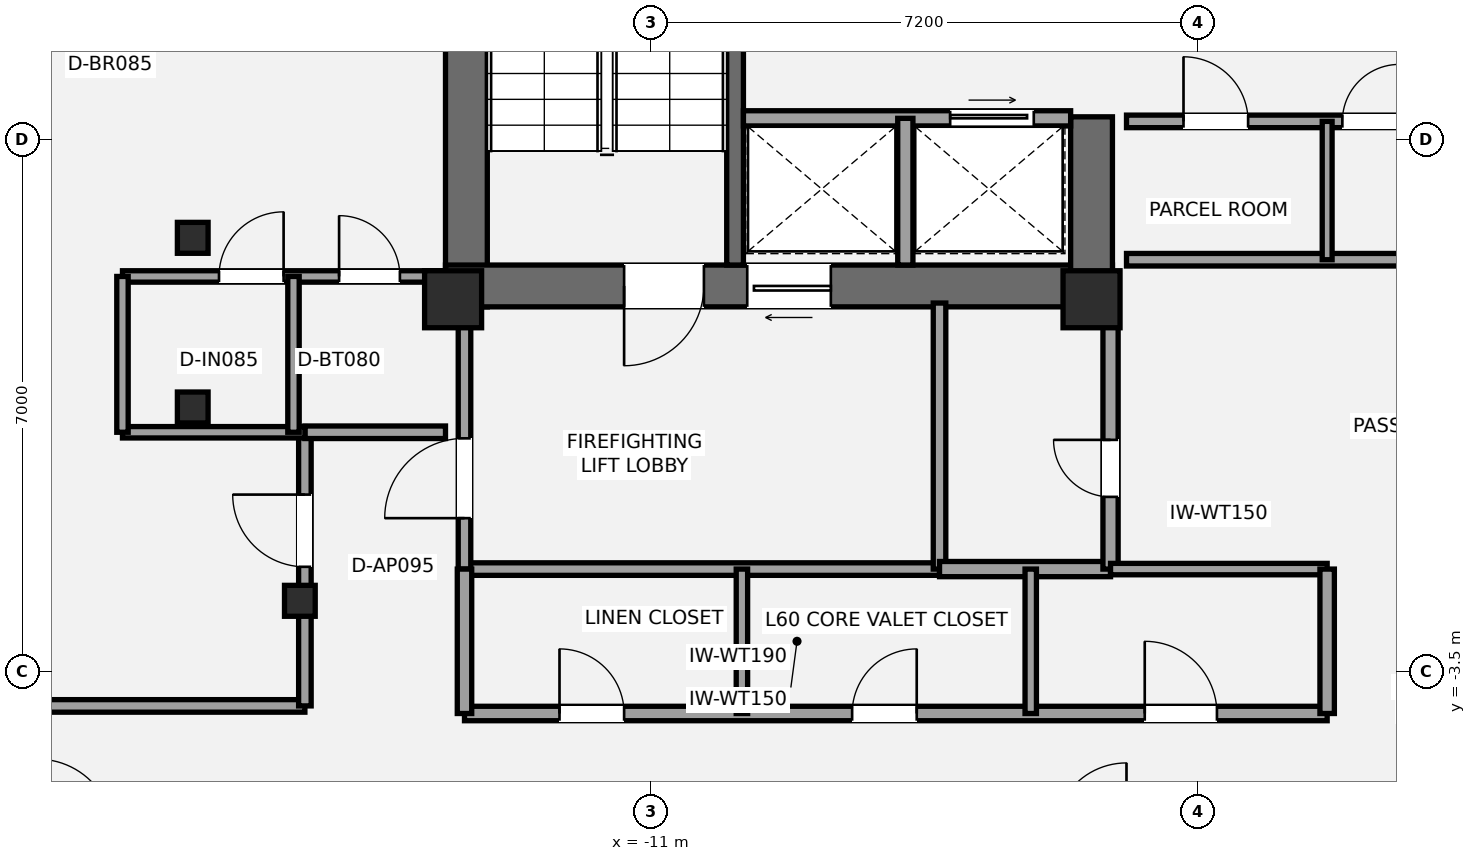
"""IFC4 building model, lengths in metres.
Left out: names, types, materials, properties, quantities, classifications, styles, units other than length and angle.
Written with IfcOpenShell. Run it as: python <this file> out.ifc"""

import sys

from ifc_helpers import new_model, si_unit, direction, frame, frame_2d, origin, origin_2d, place, context, subcontext, project, spatial, rectangle, i_section, extrude, element, fill, save


model = new_model("IFC4")
c1 = context("Model", 3, precision=1e-05, world=origin(), true_north=direction((0.0, 1.0)))
c2 = subcontext(c1, "Body", "Model", "MODEL_VIEW")
j1 = project(units=[si_unit("LENGTHUNIT", "METRE"), si_unit("PLANEANGLEUNIT", "RADIAN")], contexts=[c1])
p1 = place(None, origin())
s1 = spatial("IfcSite", under=j1, at=p1, CompositionType="ELEMENT")
p2 = place(p1, origin())
s2 = spatial("IfcBuilding", under=s1, at=p2, CompositionType="ELEMENT")
p3 = place(p2, frame((0.0, 0.0, 216.3)))
s3 = spatial("IfcBuildingStorey", under=s2, at=p3, CompositionType="ELEMENT", Elevation=216.3)
p4 = place(p3, frame((-13.425, 1.3, 0.0), z_axis=(0.0, 0.0, 1.0), x_axis=(0.0, 1.0, 0.0)))
e1 = element("IfcWall", 1, at=p4, inside=s3, PredefinedType="SHEAR", context=c2, shape_type="SweptSolid", body=[
    extrude(rectangle(XDim=8.25, YDim=0.55, at=frame_2d((4.125, 0.0))), origin(), (0.0, 0.0, 1.0), 3.15),
])
p5 = place(p3, frame((-4.925, 1.575, 0.0), z_axis=(0.0, 0.0, 1.0), x_axis=(-1.0, 0.0, 0.0)))
e2 = element("IfcWall", 2, at=p5, inside=s3, PredefinedType="SHEAR", context=c2, shape_type="SweptSolid", body=[
    extrude(rectangle(XDim=8.775, YDim=0.55, at=frame_2d((4.387, 0.0))), origin(), (0.0, 0.0, 1.0), 3.15),
])
p6 = place(p5, frame((5.375, 0.0, 0.0)))
e3 = element("IfcOpeningElement", 3, at=p6, cuts=e2, PredefinedType="OPENING", context=c2, shape_type="SweptSolid", body=[
    extrude(rectangle(XDim=1.05, YDim=2.15, at=frame_2d((0.525, 1.075))), frame((0.0, 0.285, 0.0), z_axis=(0.0, -1.0, 0.0), x_axis=(1.0, 0.0, 0.0)), (0.0, 0.0, 1.0), 0.57),
])
p7 = place(p5, frame((3.705, 0.0, 0.0)))
e4 = element("IfcOpeningElement", 4, at=p7, cuts=e2, PredefinedType="OPENING", context=c2, shape_type="SweptSolid", body=[
    extrude(rectangle(XDim=1.1, YDim=2.2, at=frame_2d((0.55, 1.1))), frame((0.0, 0.285, 0.0), z_axis=(0.0, -1.0, 0.0), x_axis=(1.0, 0.0, 0.0)), (0.0, 0.0, 1.0), 0.57),
])
p8 = place(p3, frame((-5.2, 1.3, 0.0), z_axis=(0.0, 0.0, 1.0), x_axis=(0.0, 1.0, 0.0)))
e5 = element("IfcWall", 5, at=p8, inside=s3, PredefinedType="SHEAR", context=c2, shape_type="SweptSolid", body=[
    extrude(rectangle(XDim=2.5, YDim=0.55, at=frame_2d((1.25, 0.0))), origin(), (0.0, 0.0, 1.0), 3.15),
])
p9 = place(p3, frame((-9.89, 1.85, 0.0), z_axis=(0.0, 0.0, 1.0), x_axis=(0.0, 1.0, 0.0)))
e6 = element("IfcWall", 6, at=p9, inside=s3, PredefinedType="SHEAR", context=c2, shape_type="SweptSolid", body=[
    extrude(rectangle(XDim=7.15, YDim=0.22, at=frame_2d((3.575, 0.0))), origin(), (0.0, 0.0, 1.0), 3.15),
])
for number, where, z_axis, x_axis in (
    (7, (-13.6, 1.4, 0.0), (0.0, 0.0, 1.0), (1.0, 0.0, 0.0)),
    (8, (-5.2, 1.4, 0.0), (0.0, 0.0, 1.0), (1.0, 0.0, 0.0)),
):
    element("IfcColumn", number, at=place(p3, frame(where, z_axis=z_axis, x_axis=x_axis)), inside=s3, PredefinedType="PILASTER", context=c2, shape_type="SweptSolid", body=[
        extrude(rectangle(XDim=0.75, YDim=0.75, at=origin_2d()), origin(), (0.0, 0.0, 1.0), 3.15),
    ])
for number, where, z_axis, x_axis in (
    (9, (-17.026, 2.208, 0.0), (0.0, 0.0, 1.0), (1.0, 0.0, 0.0)),
    (10, (-17.026, -0.024, 0.0), (0.0, 0.0, 1.0), (1.0, 0.0, 0.0)),
    (11, (-15.616, -2.567, 0.0), (0.0, 0.0, 1.0), (1.0, 0.0, 0.0)),
):
    element("IfcColumn", number, at=place(p3, frame(where, z_axis=z_axis, x_axis=x_axis)), inside=s3, PredefinedType="COLUMN", context=c2, shape_type="SweptSolid", body=[
        extrude(i_section(OverallWidth=0.404, OverallDepth=0.407, WebThickness=0.027, FlangeThickness=0.044, at=origin_2d()), origin(), (0.0, 0.0, 1.0), 3.15),
    ])
p10 = place(p3, frame((-13.45, -2.15, 0.0), z_axis=(0.0, 0.0, 1.0), x_axis=(1.0, 0.0, 0.0)))
e12 = element("IfcWall", 12, at=p10, inside=s3, PredefinedType="PARTITIONING", context=c2, shape_type="SweptSolid", body=[
    extrude(rectangle(XDim=6.25, YDim=0.165, at=frame_2d((3.125, 0.0))), origin(), (0.0, 0.0, 1.0), 2.423),
])
p11 = place(p3, frame((-13.45, -2.15, 0.0), z_axis=(0.0, 0.0, 1.0), x_axis=(0.0, 1.0, 0.0)))
e13 = element("IfcWall", 13, at=p11, inside=s3, PredefinedType="PARTITIONING", context=c2, shape_type="SweptSolid", body=[
    extrude(rectangle(XDim=3.5, YDim=0.165, at=frame_2d((1.75, 0.0))), origin(), (0.0, 0.0, 1.0), 2.423),
])
p12 = place(p11, frame((0.67, 0.0, 0.0)))
e14 = element("IfcOpeningElement", 14, at=p12, cuts=e13, PredefinedType="OPENING", context=c2, shape_type="SweptSolid", body=[
    extrude(rectangle(XDim=1.05, YDim=2.15, at=frame_2d((0.525, 1.075))), frame((0.0, 0.093, 0.0), z_axis=(0.0, -1.0, 0.0), x_axis=(1.0, 0.0, 0.0)), (0.0, 0.0, 1.0), 0.185),
])
p13 = place(p3, frame((-7.2, -2.15, 0.0), z_axis=(0.0, 0.0, 1.0), x_axis=(0.0, 1.0, 0.0)))
e15 = element("IfcWall", 15, at=p13, inside=s3, PredefinedType="PARTITIONING", context=c2, shape_type="SweptSolid", body=[
    extrude(rectangle(XDim=3.5, YDim=0.165, at=frame_2d((1.75, 0.0))), origin(), (0.0, 0.0, 1.0), 2.423),
])
p14 = place(p3, frame((-7.2, -2.15, 0.0), z_axis=(0.0, 0.0, 1.0), x_axis=(1.0, 0.0, 0.0)))
e16 = element("IfcWall", 16, at=p14, inside=s3, PredefinedType="SOLIDWALL", context=c2, shape_type="SweptSolid", body=[
    extrude(rectangle(XDim=2.25, YDim=0.2, at=frame_2d((1.125, 0.0))), origin(), (0.0, 0.0, 1.0), 2.423),
])
p15 = place(p3, frame((-4.95, -2.15, 0.0), z_axis=(0.0, 0.0, 1.0), x_axis=(0.0, 1.0, 0.0)))
e17 = element("IfcWall", 17, at=p15, inside=s3, PredefinedType="SOLIDWALL", context=c2, shape_type="SweptSolid", body=[
    extrude(rectangle(XDim=3.5, YDim=0.2, at=frame_2d((1.75, 0.0))), origin(), (0.0, 0.0, 1.0), 2.423),
])
p16 = place(p15, frame((0.95, 0.0, 0.0)))
e18 = element("IfcOpeningElement", 18, at=p16, cuts=e17, PredefinedType="OPENING", context=c2, shape_type="SweptSolid", body=[
    extrude(rectangle(XDim=0.75, YDim=2.1, at=frame_2d((0.375, 1.05))), frame((0.0, 0.11, 0.0), z_axis=(0.0, -1.0, 0.0), x_axis=(1.0, 0.0, 0.0)), (0.0, 0.0, 1.0), 0.22),
])
p17 = place(p3, frame((-9.78, 3.78, 0.0), z_axis=(0.0, 0.0, 1.0), x_axis=(1.0, 0.0, 0.0)))
e19 = element("IfcWall", 19, at=p17, inside=s3, PredefinedType="SOLIDWALL", context=c2, shape_type="SweptSolid", body=[
    extrude(rectangle(XDim=4.305, YDim=0.2, at=frame_2d((2.152, 0.0))), origin(), (0.0, 0.0, 1.0), 2.97),
])
p18 = place(p17, frame((2.72, 0.0, 0.0)))
e20 = element("IfcOpeningElement", 20, at=p18, cuts=e19, PredefinedType="OPENING", context=c2, shape_type="SweptSolid", body=[
    extrude(rectangle(XDim=1.1, YDim=2.2, at=frame_2d((0.55, 1.1))), frame((0.0, 0.11, 0.0), z_axis=(0.0, -1.0, 0.0), x_axis=(1.0, 0.0, 0.0)), (0.0, 0.0, 1.0), 0.22),
])
p19 = place(p3, frame((-7.65, 1.85, 0.0), z_axis=(0.0, 0.0, 1.0), x_axis=(0.0, 1.0, 0.0)))
e21 = element("IfcWall", 21, at=p19, inside=s3, PredefinedType="SOLIDWALL", context=c2, shape_type="SweptSolid", body=[
    extrude(rectangle(XDim=1.93, YDim=0.2, at=frame_2d((0.965, 0.0))), origin(), (0.0, 0.0, 1.0), 2.97),
])
p20 = place(p3, frame((-4.74, 1.92, 0.0), z_axis=(0.0, 0.0, 1.0), x_axis=(1.0, 0.0, 0.0)))
e22 = element("IfcWall", 22, at=p20, inside=s3, PredefinedType="PARTITIONING", context=c2, shape_type="SweptSolid", body=[
    extrude(rectangle(XDim=3.89, YDim=0.165, at=frame_2d((1.945, 0.0))), origin(), (0.0, 0.0, 1.0), 2.11),
])
p21 = place(p3, frame((-4.74, 3.74, 0.0), z_axis=(0.0, 0.0, 1.0), x_axis=(1.0, 0.0, 0.0)))
e23 = element("IfcWall", 23, at=p21, inside=s3, PredefinedType="PARTITIONING", context=c2, shape_type="SweptSolid", body=[
    extrude(rectangle(XDim=3.89, YDim=0.165, at=frame_2d((1.945, 0.0))), origin(), (0.0, 0.0, 1.0), 2.97),
])
p22 = place(p21, frame((0.75, 0.0, 0.0)))
e24 = element("IfcOpeningElement", 24, at=p22, cuts=e23, PredefinedType="OPENING", context=c2, shape_type="SweptSolid", body=[
    extrude(rectangle(XDim=0.85, YDim=2.1, at=frame_2d((0.425, 1.05))), frame((0.0, 0.093, 0.0), z_axis=(0.0, -1.0, 0.0), x_axis=(1.0, 0.0, 0.0)), (0.0, 0.0, 1.0), 0.185),
])
p23 = place(p21, frame((2.84, 0.0, 0.0)))
e25 = element("IfcOpeningElement", 25, at=p23, cuts=e23, PredefinedType="OPENING", context=c2, shape_type="SweptSolid", body=[
    extrude(rectangle(XDim=0.75, YDim=2.1, at=frame_2d((0.375, 1.05))), frame((0.0, 0.093, 0.0), z_axis=(0.0, -1.0, 0.0), x_axis=(1.0, 0.0, 0.0)), (0.0, 0.0, 1.0), 0.185),
])
p24 = place(p3, frame((-2.1, 1.92, 0.0), z_axis=(0.0, 0.0, 1.0), x_axis=(0.0, 1.0, 0.0)))
e26 = element("IfcWall", 26, at=p24, inside=s3, PredefinedType="PARTITIONING", context=c2, shape_type="SweptSolid", body=[
    extrude(rectangle(XDim=1.82, YDim=0.13, at=frame_2d((0.91, 0.0))), origin(), (0.0, 0.0, 1.0), 2.97),
])
p25 = place(p3, frame((-13.45, -4.05, 0.0), z_axis=(0.0, 0.0, 1.0), x_axis=(1.0, 0.0, 0.0)))
e27 = element("IfcWall", 27, at=p25, inside=s3, PredefinedType="PLUMBINGWALL", context=c2, shape_type="SweptSolid", body=[
    extrude(rectangle(XDim=11.35, YDim=0.19, at=frame_2d((5.675, 0.0))), origin(), (0.0, 0.0, 1.0), 2.357),
])
p26 = place(p25, frame((1.25, 0.0, 0.0)))
e28 = element("IfcOpeningElement", 28, at=p26, cuts=e27, PredefinedType="OPENING", context=c2, shape_type="SweptSolid", body=[
    extrude(rectangle(XDim=0.85, YDim=2.1, at=frame_2d((0.425, 1.05))), frame((0.0, 0.105, 0.0), z_axis=(0.0, -1.0, 0.0), x_axis=(1.0, 0.0, 0.0)), (0.0, 0.0, 1.0), 0.21),
])
p27 = place(p25, frame((5.1, 0.0, 0.0)))
e29 = element("IfcOpeningElement", 29, at=p27, cuts=e27, PredefinedType="OPENING", context=c2, shape_type="SweptSolid", body=[
    extrude(rectangle(XDim=0.85, YDim=2.1, at=frame_2d((0.425, 1.05))), frame((0.0, 0.105, 0.0), z_axis=(0.0, -1.0, 0.0), x_axis=(1.0, 0.0, 0.0)), (0.0, 0.0, 1.0), 0.21),
])
p28 = place(p25, frame((8.95, 0.0, 0.0)))
e30 = element("IfcOpeningElement", 30, at=p28, cuts=e27, PredefinedType="OPENING", context=c2, shape_type="SweptSolid", body=[
    extrude(rectangle(XDim=0.95, YDim=2.15, at=frame_2d((0.475, 1.075))), frame((0.0, 0.105, 0.0), z_axis=(0.0, -1.0, 0.0), x_axis=(1.0, 0.0, 0.0)), (0.0, 0.0, 1.0), 0.21),
])
p29 = place(p3, frame((-4.95, -2.15, 0.0), z_axis=(0.0, 0.0, 1.0), x_axis=(1.0, 0.0, 0.0)))
e31 = element("IfcWall", 31, at=p29, inside=s3, PredefinedType="PLUMBINGWALL", context=c2, shape_type="SweptSolid", body=[
    extrude(rectangle(XDim=2.85, YDim=0.15, at=frame_2d((1.425, 0.0))), origin(), (0.0, 0.0, 1.0), 2.97),
])
for number, where, z_axis, x_axis in (
    (32, (-13.45, -4.05, 0.0), (0.0, 0.0, 1.0), (0.0, 1.0, 0.0)),
    (33, (-2.1, -4.05, 0.0), (0.0, 0.0, 1.0), (0.0, 1.0, 0.0)),
):
    element("IfcWall", number, at=place(p3, frame(where, z_axis=z_axis, x_axis=x_axis)), inside=s3, PredefinedType="PLUMBINGWALL", context=c2, shape_type="SweptSolid", body=[
        extrude(rectangle(XDim=1.9, YDim=0.19, at=frame_2d((0.95, 0.0))), origin(), (0.0, 0.0, 1.0), 2.423),
    ])
p30 = place(p3, frame((-9.8, -4.05, 0.0), z_axis=(0.0, 0.0, 1.0), x_axis=(0.0, 1.0, 0.0)))
e34 = element("IfcWall", 34, at=p30, inside=s3, PredefinedType="PLUMBINGWALL", context=c2, shape_type="SweptSolid", body=[
    extrude(rectangle(XDim=1.9, YDim=0.15, at=frame_2d((0.95, 0.0))), origin(), (0.0, 0.0, 1.0), 2.97),
])
p31 = place(p3, frame((-6.0, -4.05, 0.0), z_axis=(0.0, 0.0, 1.0), x_axis=(0.0, 1.0, 0.0)))
e35 = element("IfcWall", 35, at=p31, inside=s3, PredefinedType="PLUMBINGWALL", context=c2, shape_type="SweptSolid", body=[
    extrude(rectangle(XDim=1.9, YDim=0.15, at=frame_2d((0.95, 0.0))), origin(), (0.0, 0.0, 1.0), 2.423),
])
p32 = place(p3, frame((-21.871, -3.95, 0.0), z_axis=(0.0, 0.0, 1.0), x_axis=(1.0, 0.0, 0.0)))
e36 = element("IfcWall", 36, at=p32, inside=s3, PredefinedType="PARTITIONING", context=c2, shape_type="SweptSolid", body=[
    extrude(rectangle(XDim=6.321, YDim=0.165, at=frame_2d((3.16, 0.0))), origin(), (0.0, 0.0, 1.0), 2.423),
])
p33 = place(p3, frame((-15.55, -3.95, 0.0), z_axis=(0.0, 0.0, 1.0), x_axis=(0.0, 1.0, 0.0)))
e37 = element("IfcWall", 37, at=p33, inside=s3, PredefinedType="PARTITIONING", context=c2, shape_type="SweptSolid", body=[
    extrude(rectangle(XDim=3.6, YDim=0.165, at=frame_2d((1.8, 0.0))), origin(), (0.0, 0.0, 1.0), 2.357),
])
p34 = place(p33, frame((1.83, 0.0, 0.0)))
e38 = element("IfcOpeningElement", 38, at=p34, cuts=e37, PredefinedType="OPENING", context=c2, shape_type="SweptSolid", body=[
    extrude(rectangle(XDim=0.95, YDim=2.15, at=frame_2d((0.475, 1.075))), frame((0.0, 0.093, 0.0), z_axis=(0.0, -1.0, 0.0), x_axis=(1.0, 0.0, 0.0)), (0.0, 0.0, 1.0), 0.185),
])
p35 = place(p3, frame((-15.55, -0.35, 0.0), z_axis=(0.0, 0.0, 1.0), x_axis=(1.0, 0.0, 0.0)))
e39 = element("IfcWall", 39, at=p35, inside=s3, PredefinedType="PARTITIONING", context=c2, shape_type="SweptSolid", body=[
    extrude(rectangle(XDim=1.85, YDim=0.165, at=frame_2d((0.925, 0.0))), origin(), (0.0, 0.0, 1.0), 2.97),
])
p36 = place(p3, frame((-17.95, 1.7, 0.0), z_axis=(0.0, 0.0, 1.0), x_axis=(1.0, 0.0, 0.0)))
e40 = element("IfcWall", 40, at=p36, inside=s3, PredefinedType="PLUMBINGWALL", context=c2, shape_type="SweptSolid", body=[
    extrude(rectangle(XDim=4.25, YDim=0.15, at=frame_2d((2.125, 0.0))), origin(), (0.0, 0.0, 1.0), 2.423),
])
p37 = place(p36, frame((2.85, 0.0, 0.0)))
e41 = element("IfcOpeningElement", 41, at=p37, cuts=e40, PredefinedType="OPENING", context=c2, shape_type="SweptSolid", body=[
    extrude(rectangle(XDim=0.8, YDim=2.1, at=frame_2d((0.4, 1.05))), frame((0.0, 0.085, 0.0), z_axis=(0.0, -1.0, 0.0), x_axis=(1.0, 0.0, 0.0)), (0.0, 0.0, 1.0), 0.17),
])
p38 = place(p36, frame((1.27, 0.0, 0.0)))
e42 = element("IfcOpeningElement", 42, at=p38, cuts=e40, PredefinedType="OPENING", context=c2, shape_type="SweptSolid", body=[
    extrude(rectangle(XDim=0.85, YDim=2.1, at=frame_2d((0.425, 1.05))), frame((0.0, 0.085, 0.0), z_axis=(0.0, -1.0, 0.0), x_axis=(1.0, 0.0, 0.0)), (0.0, 0.0, 1.0), 0.17),
])
p39 = place(p3, frame((-17.95, -0.35, 0.0), z_axis=(0.0, 0.0, 1.0), x_axis=(1.0, 0.0, 0.0)))
e43 = element("IfcWall", 43, at=p39, inside=s3, PredefinedType="PLUMBINGWALL", context=c2, shape_type="SweptSolid", body=[
    extrude(rectangle(XDim=2.4, YDim=0.15, at=frame_2d((1.2, 0.0))), origin(), (0.0, 0.0, 1.0), 2.97),
])
p40 = place(p3, frame((-15.7, -0.35, 0.0), z_axis=(0.0, 0.0, 1.0), x_axis=(0.0, 1.0, 0.0)))
e44 = element("IfcWall", 44, at=p40, inside=s3, PredefinedType="PLUMBINGWALL", context=c2, shape_type="SweptSolid", body=[
    extrude(rectangle(XDim=2.05, YDim=0.15, at=frame_2d((1.025, 0.0))), origin(), (0.0, 0.0, 1.0), 2.97),
])
p41 = place(p3, frame((-17.95, -0.35, 0.0), z_axis=(0.0, 0.0, 1.0), x_axis=(0.0, 1.0, 0.0)))
e45 = element("IfcWall", 45, at=p41, inside=s3, PredefinedType="PLUMBINGWALL", context=c2, shape_type="SweptSolid", body=[
    extrude(rectangle(XDim=2.05, YDim=0.15, at=frame_2d((1.025, 0.0))), origin(), (0.0, 0.0, 1.0), 2.423),
])
p42 = place(p6, origin())
e46 = element("IfcDoor", 46, at=p42, inside=s3, OperationType="SINGLE_SWING_RIGHT", PredefinedType="DOOR", context=c2, shape_type="SweptSolid", body=[
    extrude(rectangle(XDim=1.05, YDim=2.15, at=frame_2d((0.525, 1.075))), frame((0.0, 0.025, 0.0), z_axis=(0.0, -1.0, 0.0), x_axis=(1.0, 0.0, 0.0)), (0.0, 0.0, 1.0), 0.05),
])
fill(e3, e46)
p43 = place(p12, origin())
e47 = element("IfcDoor", 47, at=p43, inside=s3, OperationType="SINGLE_SWING_LEFT", PredefinedType="DOOR", context=c2, shape_type="SweptSolid", body=[
    extrude(rectangle(XDim=1.05, YDim=2.15, at=frame_2d((0.525, 1.075))), frame((0.0, 0.025, 0.0), z_axis=(0.0, -1.0, 0.0), x_axis=(1.0, 0.0, 0.0)), (0.0, 0.0, 1.0), 0.05),
])
fill(e14, e47)
p44 = place(p16, origin())
e48 = element("IfcDoor", 48, at=p44, inside=s3, OperationType="SINGLE_SWING_RIGHT", PredefinedType="DOOR", context=c2, shape_type="SweptSolid", body=[
    extrude(rectangle(XDim=0.75, YDim=2.1, at=frame_2d((0.375, 1.05))), frame((0.0, 0.025, 0.0), z_axis=(0.0, -1.0, 0.0), x_axis=(1.0, 0.0, 0.0)), (0.0, 0.0, 1.0), 0.05),
])
fill(e18, e48)
p45 = place(p7, origin())
e49 = element("IfcDoor", 49, at=p45, inside=s3, OperationType="SLIDING_TO_LEFT", PredefinedType="DOOR", context=c2, shape_type="SweptSolid", body=[
    extrude(rectangle(XDim=1.1, YDim=2.2, at=frame_2d((0.55, 1.1))), frame((0.0, 0.025, 0.0), z_axis=(0.0, -1.0, 0.0), x_axis=(1.0, 0.0, 0.0)), (0.0, 0.0, 1.0), 0.05),
])
fill(e4, e49)
p46 = place(p18, origin())
e50 = element("IfcDoor", 50, at=p46, inside=s3, OperationType="SLIDING_TO_LEFT", PredefinedType="DOOR", context=c2, shape_type="SweptSolid", body=[
    extrude(rectangle(XDim=1.1, YDim=2.2, at=frame_2d((0.55, 1.1))), frame((0.0, 0.025, 0.0), z_axis=(0.0, -1.0, 0.0), x_axis=(1.0, 0.0, 0.0)), (0.0, 0.0, 1.0), 0.05),
])
fill(e20, e50)
p47 = place(p22, origin())
e51 = element("IfcDoor", 51, at=p47, inside=s3, OperationType="SINGLE_SWING_LEFT", PredefinedType="DOOR", context=c2, shape_type="SweptSolid", body=[
    extrude(rectangle(XDim=0.85, YDim=2.1, at=frame_2d((0.425, 1.05))), frame((0.0, 0.025, 0.0), z_axis=(0.0, -1.0, 0.0), x_axis=(1.0, 0.0, 0.0)), (0.0, 0.0, 1.0), 0.05),
])
fill(e24, e51)
p48 = place(p23, origin())
e52 = element("IfcDoor", 52, at=p48, inside=s3, OperationType="SINGLE_SWING_RIGHT", PredefinedType="DOOR", context=c2, shape_type="SweptSolid", body=[
    extrude(rectangle(XDim=0.75, YDim=2.1, at=frame_2d((0.375, 1.05))), frame((0.0, 0.025, 0.0), z_axis=(0.0, -1.0, 0.0), x_axis=(1.0, 0.0, 0.0)), (0.0, 0.0, 1.0), 0.05),
])
fill(e25, e52)
p49 = place(p26, origin())
e53 = element("IfcDoor", 53, at=p49, inside=s3, OperationType="SINGLE_SWING_LEFT", PredefinedType="DOOR", context=c2, shape_type="SweptSolid", body=[
    extrude(rectangle(XDim=0.85, YDim=2.1, at=frame_2d((0.425, 1.05))), frame((0.0, 0.025, 0.0), z_axis=(0.0, -1.0, 0.0), x_axis=(1.0, 0.0, 0.0)), (0.0, 0.0, 1.0), 0.05),
])
fill(e28, e53)
p50 = place(p27, origin())
e54 = element("IfcDoor", 54, at=p50, inside=s3, OperationType="SINGLE_SWING_RIGHT", PredefinedType="DOOR", context=c2, shape_type="SweptSolid", body=[
    extrude(rectangle(XDim=0.85, YDim=2.1, at=frame_2d((0.425, 1.05))), frame((0.0, 0.025, 0.0), z_axis=(0.0, -1.0, 0.0), x_axis=(1.0, 0.0, 0.0)), (0.0, 0.0, 1.0), 0.05),
])
fill(e29, e54)
p51 = place(p28, origin())
e55 = element("IfcDoor", 55, at=p51, inside=s3, OperationType="SINGLE_SWING_LEFT", PredefinedType="DOOR", context=c2, shape_type="SweptSolid", body=[
    extrude(rectangle(XDim=0.95, YDim=2.15, at=frame_2d((0.475, 1.075))), frame((0.0, 0.025, 0.0), z_axis=(0.0, -1.0, 0.0), x_axis=(1.0, 0.0, 0.0)), (0.0, 0.0, 1.0), 0.05),
])
fill(e30, e55)
p52 = place(p34, origin())
e56 = element("IfcDoor", 56, at=p52, inside=s3, OperationType="SINGLE_SWING_RIGHT", PredefinedType="DOOR", context=c2, shape_type="SweptSolid", body=[
    extrude(rectangle(XDim=0.95, YDim=2.15, at=frame_2d((0.475, 1.075))), frame((0.0, 0.025, 0.0), z_axis=(0.0, -1.0, 0.0), x_axis=(1.0, 0.0, 0.0)), (0.0, 0.0, 1.0), 0.05),
])
fill(e38, e56)
p53 = place(p37, origin())
e57 = element("IfcDoor", 57, at=p53, inside=s3, OperationType="SINGLE_SWING_LEFT", PredefinedType="DOOR", context=c2, shape_type="SweptSolid", body=[
    extrude(rectangle(XDim=0.8, YDim=2.1, at=frame_2d((0.4, 1.05))), frame((0.0, 0.025, 0.0), z_axis=(0.0, -1.0, 0.0), x_axis=(1.0, 0.0, 0.0)), (0.0, 0.0, 1.0), 0.05),
])
fill(e41, e57)
p54 = place(p38, origin())
e58 = element("IfcDoor", 58, at=p54, inside=s3, OperationType="SINGLE_SWING_RIGHT", PredefinedType="DOOR", context=c2, shape_type="SweptSolid", body=[
    extrude(rectangle(XDim=0.85, YDim=2.1, at=frame_2d((0.425, 1.05))), frame((0.0, 0.025, 0.0), z_axis=(0.0, -1.0, 0.0), x_axis=(1.0, 0.0, 0.0)), (0.0, 0.0, 1.0), 0.05),
])
fill(e42, e58)
save(model, sys.argv[1])
